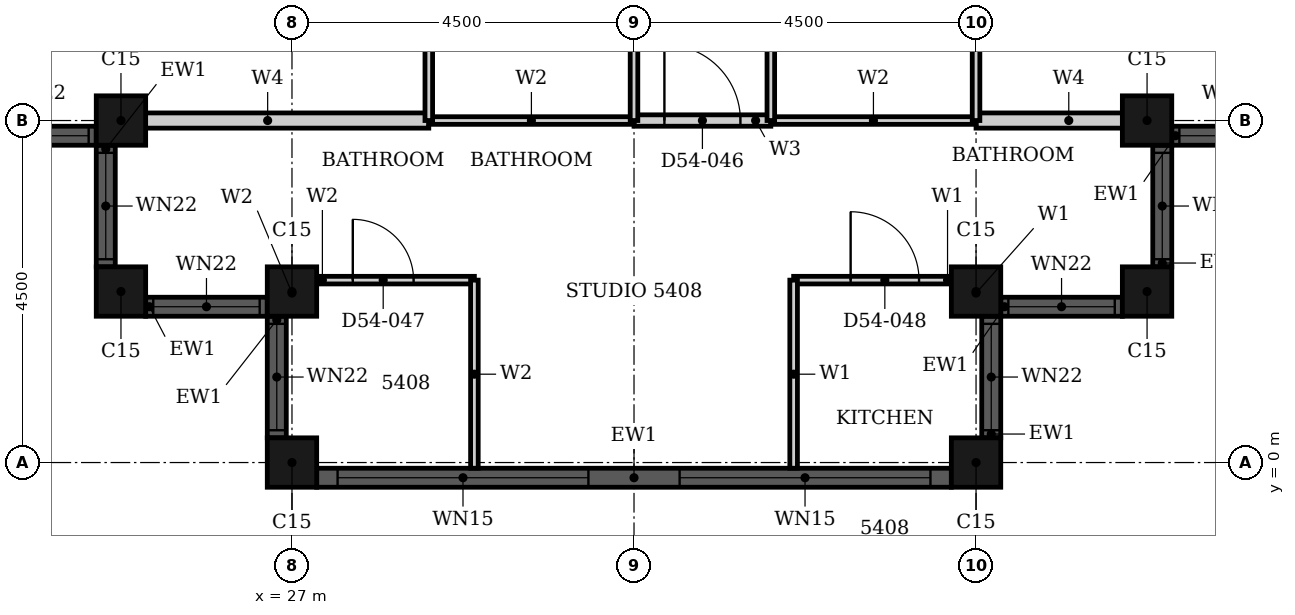
"""IFC4 building model, lengths in metres.
Left out: names, types, materials, properties, quantities, classifications, styles, units other than length and angle.
Written with IfcOpenShell. Run it as: python <this file> out.ifc"""

import sys

from ifc_helpers import new_model, si_unit, direction, frame, frame_2d, origin, origin_2d, place, context, subcontext, project, spatial, rectangle, hollow_rectangle, extrude, element, fill, save


model = new_model("IFC4")
c1 = context("Model", 3, precision=1e-05, world=origin(), true_north=direction((0.0, 1.0)))
c2 = subcontext(c1, "Body", "Model", "MODEL_VIEW")
j1 = project(units=[si_unit("LENGTHUNIT", "METRE"), si_unit("PLANEANGLEUNIT", "RADIAN")], contexts=[c1])
p1 = place(None, origin())
s1 = spatial("IfcSite", under=j1, at=p1, CompositionType="ELEMENT")
p2 = place(p1, origin())
s2 = spatial("IfcBuilding", under=s1, at=p2, CompositionType="ELEMENT")
p3 = place(p2, frame((0.0, 0.0, 214.6)))
s3 = spatial("IfcBuildingStorey", under=s2, at=p3, CompositionType="ELEMENT", Elevation=214.6)
for number, where, z_axis, x_axis in (
    (1, (24.75, 4.5, 0.0), (0.0, 0.0, 1.0), (1.0, 0.0, 0.0)),
    (2, (24.75, 2.25, 0.0), (0.0, 0.0, 1.0), (1.0, 0.0, 0.0)),
    (3, (27.0, 2.25, 0.0), (0.0, 0.0, 1.0), (1.0, 0.0, 0.0)),
    (4, (27.0, 0.0, 0.0), (0.0, 0.0, 1.0), (1.0, 0.0, 0.0)),
    (5, (36.0, 0.0, 0.0), (0.0, 0.0, 1.0), (1.0, 0.0, 0.0)),
    (6, (36.0, 2.25, 0.0), (0.0, 0.0, 1.0), (1.0, 0.0, 0.0)),
    (7, (38.25, 2.25, 0.0), (0.0, 0.0, 1.0), (1.0, 0.0, 0.0)),
    (8, (38.25, 4.5, 0.0), (0.0, 0.0, 1.0), (1.0, 0.0, 0.0)),
):
    element("IfcColumn", number, at=place(p3, frame(where, z_axis=z_axis, x_axis=x_axis)), inside=s3, PredefinedType="COLUMN", context=c2, shape_type="SweptSolid", body=[
        extrude(hollow_rectangle(XDim=0.65, YDim=0.65, WallThickness=0.021, at=origin_2d()), origin(), (0.0, 0.0, 1.0), 3.7),
    ])
p4 = place(p3, frame((22.825, 4.3, 0.0), z_axis=(0.0, 0.0, 1.0), x_axis=(1.0, 0.0, 0.0)))
e9 = element("IfcWall", 9, at=p4, inside=s3, PredefinedType="SOLIDWALL", context=c2, shape_type="SweptSolid", body=[
    extrude(rectangle(XDim=1.6, YDim=0.25, at=frame_2d((0.8, 0.0))), origin(), (0.0, 0.0, 1.0), 3.7),
])
p5 = place(p4, frame((0.1, 0.0, 0.9)))
e10 = element("IfcOpeningElement", 10, at=p5, cuts=e9, PredefinedType="OPENING", context=c2, shape_type="SweptSolid", body=[
    extrude(rectangle(XDim=1.4, YDim=1.85, at=frame_2d((0.7, 0.925))), frame((0.0, 0.135, 0.0), z_axis=(0.0, -1.0, 0.0), x_axis=(1.0, 0.0, 0.0)), (0.0, 0.0, 1.0), 0.27),
])
p6 = place(p3, frame((24.55, 4.175, 0.0), z_axis=(0.0, 0.0, 1.0), x_axis=(0.0, -1.0, 0.0)))
e11 = element("IfcWall", 11, at=p6, inside=s3, PredefinedType="SOLIDWALL", context=c2, shape_type="SweptSolid", body=[
    extrude(rectangle(XDim=1.6, YDim=0.25, at=frame_2d((0.8, 0.0))), origin(), (0.0, 0.0, 1.0), 3.7),
])
p7 = place(p6, frame((0.1, 0.0, 0.9)))
e12 = element("IfcOpeningElement", 12, at=p7, cuts=e11, PredefinedType="OPENING", context=c2, shape_type="SweptSolid", body=[
    extrude(rectangle(XDim=1.4, YDim=1.85, at=frame_2d((0.7, 0.925))), frame((0.0, 0.135, 0.0), z_axis=(0.0, -1.0, 0.0), x_axis=(1.0, 0.0, 0.0)), (0.0, 0.0, 1.0), 0.27),
])
p8 = place(p3, frame((25.075, 2.05, 0.0), z_axis=(0.0, 0.0, 1.0), x_axis=(1.0, 0.0, 0.0)))
e13 = element("IfcWall", 13, at=p8, inside=s3, PredefinedType="SOLIDWALL", context=c2, shape_type="SweptSolid", body=[
    extrude(rectangle(XDim=1.6, YDim=0.25, at=frame_2d((0.8, 0.0))), origin(), (0.0, 0.0, 1.0), 3.7),
])
p9 = place(p8, frame((0.1, 0.0, 0.9)))
e14 = element("IfcOpeningElement", 14, at=p9, cuts=e13, PredefinedType="OPENING", context=c2, shape_type="SweptSolid", body=[
    extrude(rectangle(XDim=1.4, YDim=1.85, at=frame_2d((0.7, 0.925))), frame((0.0, 0.135, 0.0), z_axis=(0.0, -1.0, 0.0), x_axis=(1.0, 0.0, 0.0)), (0.0, 0.0, 1.0), 0.27),
])
p10 = place(p3, frame((26.8, 1.925, 0.0), z_axis=(0.0, 0.0, 1.0), x_axis=(0.0, -1.0, 0.0)))
e15 = element("IfcWall", 15, at=p10, inside=s3, PredefinedType="SOLIDWALL", context=c2, shape_type="SweptSolid", body=[
    extrude(rectangle(XDim=1.6, YDim=0.25, at=frame_2d((0.8, 0.0))), origin(), (0.0, 0.0, 1.0), 3.7),
])
p11 = place(p10, frame((0.1, 0.0, 0.9)))
e16 = element("IfcOpeningElement", 16, at=p11, cuts=e15, PredefinedType="OPENING", context=c2, shape_type="SweptSolid", body=[
    extrude(rectangle(XDim=1.4, YDim=1.85, at=frame_2d((0.7, 0.925))), frame((0.0, 0.135, 0.0), z_axis=(0.0, -1.0, 0.0), x_axis=(1.0, 0.0, 0.0)), (0.0, 0.0, 1.0), 0.27),
])
p12 = place(p3, frame((27.325, -0.2, 0.0), z_axis=(0.0, 0.0, 1.0), x_axis=(1.0, 0.0, 0.0)))
e17 = element("IfcWall", 17, at=p12, inside=s3, PredefinedType="SOLIDWALL", context=c2, shape_type="SweptSolid", body=[
    extrude(rectangle(XDim=8.35, YDim=0.25, at=frame_2d((4.175, 0.0))), origin(), (0.0, 0.0, 1.0), 3.7),
])
p13 = place(p12, frame((0.275, 0.0, 0.45)))
e18 = element("IfcOpeningElement", 18, at=p13, cuts=e17, PredefinedType="OPENING", context=c2, shape_type="SweptSolid", body=[
    extrude(rectangle(XDim=3.3, YDim=2.3, at=frame_2d((1.65, 1.15))), frame((0.0, 0.135, 0.0), z_axis=(0.0, -1.0, 0.0), x_axis=(1.0, 0.0, 0.0)), (0.0, 0.0, 1.0), 0.27),
])
p14 = place(p12, frame((4.775, 0.0, 0.45)))
e19 = element("IfcOpeningElement", 19, at=p14, cuts=e17, PredefinedType="OPENING", context=c2, shape_type="SweptSolid", body=[
    extrude(rectangle(XDim=3.3, YDim=2.3, at=frame_2d((1.65, 1.15))), frame((0.0, 0.135, 0.0), z_axis=(0.0, -1.0, 0.0), x_axis=(1.0, 0.0, 0.0)), (0.0, 0.0, 1.0), 0.27),
])
p15 = place(p3, frame((36.2, 0.325, 0.0), z_axis=(0.0, 0.0, 1.0), x_axis=(0.0, 1.0, 0.0)))
e20 = element("IfcWall", 20, at=p15, inside=s3, PredefinedType="SOLIDWALL", context=c2, shape_type="SweptSolid", body=[
    extrude(rectangle(XDim=1.6, YDim=0.25, at=frame_2d((0.8, 0.0))), origin(), (0.0, 0.0, 1.0), 3.7),
])
p16 = place(p15, frame((0.1, 0.0, 0.9)))
e21 = element("IfcOpeningElement", 21, at=p16, cuts=e20, PredefinedType="OPENING", context=c2, shape_type="SweptSolid", body=[
    extrude(rectangle(XDim=1.4, YDim=1.85, at=frame_2d((0.7, 0.925))), frame((0.0, 0.135, 0.0), z_axis=(0.0, -1.0, 0.0), x_axis=(1.0, 0.0, 0.0)), (0.0, 0.0, 1.0), 0.27),
])
p17 = place(p3, frame((36.325, 2.05, 0.0), z_axis=(0.0, 0.0, 1.0), x_axis=(1.0, 0.0, 0.0)))
e22 = element("IfcWall", 22, at=p17, inside=s3, PredefinedType="SOLIDWALL", context=c2, shape_type="SweptSolid", body=[
    extrude(rectangle(XDim=1.6, YDim=0.25, at=frame_2d((0.8, 0.0))), origin(), (0.0, 0.0, 1.0), 3.7),
])
p18 = place(p17, frame((0.1, 0.0, 0.9)))
e23 = element("IfcOpeningElement", 23, at=p18, cuts=e22, PredefinedType="OPENING", context=c2, shape_type="SweptSolid", body=[
    extrude(rectangle(XDim=1.4, YDim=1.85, at=frame_2d((0.7, 0.925))), frame((0.0, 0.135, 0.0), z_axis=(0.0, -1.0, 0.0), x_axis=(1.0, 0.0, 0.0)), (0.0, 0.0, 1.0), 0.27),
])
p19 = place(p3, frame((38.45, 2.575, 0.0), z_axis=(0.0, 0.0, 1.0), x_axis=(0.0, 1.0, 0.0)))
e24 = element("IfcWall", 24, at=p19, inside=s3, PredefinedType="SOLIDWALL", context=c2, shape_type="SweptSolid", body=[
    extrude(rectangle(XDim=1.6, YDim=0.25, at=frame_2d((0.8, 0.0))), origin(), (0.0, 0.0, 1.0), 3.7),
])
p20 = place(p19, frame((0.1, 0.0, 0.9)))
e25 = element("IfcOpeningElement", 25, at=p20, cuts=e24, PredefinedType="OPENING", context=c2, shape_type="SweptSolid", body=[
    extrude(rectangle(XDim=1.4, YDim=1.85, at=frame_2d((0.7, 0.925))), frame((0.0, 0.135, 0.0), z_axis=(0.0, -1.0, 0.0), x_axis=(1.0, 0.0, 0.0)), (0.0, 0.0, 1.0), 0.27),
])
p21 = place(p3, frame((38.575, 4.3, 0.0), z_axis=(0.0, 0.0, 1.0), x_axis=(1.0, 0.0, 0.0)))
e26 = element("IfcWall", 26, at=p21, inside=s3, PredefinedType="SOLIDWALL", context=c2, shape_type="SweptSolid", body=[
    extrude(rectangle(XDim=1.6, YDim=0.25, at=frame_2d((0.8, 0.0))), origin(), (0.0, 0.0, 1.0), 3.7),
])
p22 = place(p21, frame((0.1, 0.0, 0.9)))
e27 = element("IfcOpeningElement", 27, at=p22, cuts=e26, PredefinedType="OPENING", context=c2, shape_type="SweptSolid", body=[
    extrude(rectangle(XDim=1.4, YDim=1.85, at=frame_2d((0.7, 0.925))), frame((0.0, 0.135, 0.0), z_axis=(0.0, -1.0, 0.0), x_axis=(1.0, 0.0, 0.0)), (0.0, 0.0, 1.0), 0.27),
])
p23 = place(p3, frame((31.5, 4.5, 0.0), z_axis=(0.0, 0.0, 1.0), x_axis=(1.0, 0.0, 0.0)))
e28 = element("IfcWall", 28, at=p23, inside=s3, PredefinedType="PARTITIONING", context=c2, shape_type="SweptSolid", body=[
    extrude(rectangle(XDim=1.8, YDim=0.15, at=frame_2d((0.9, 0.0))), origin(), (0.0, 0.0, 1.0), 3.4),
])
p24 = place(p23, frame((0.4, 0.0, 0.0)))
e29 = element("IfcOpeningElement", 29, at=p24, cuts=e28, PredefinedType="OPENING", context=c2, shape_type="SweptSolid", body=[
    extrude(rectangle(XDim=1.0, YDim=2.2, at=frame_2d((0.5, 1.1))), frame((0.0, 0.085, 0.0), z_axis=(0.0, -1.0, 0.0), x_axis=(1.0, 0.0, 0.0)), (0.0, 0.0, 1.0), 0.17),
])
p25 = place(p3, frame((33.6, 2.4, 0.0), z_axis=(0.0, 0.0, 1.0), x_axis=(1.0, 0.0, 0.0)))
e30 = element("IfcWall", 30, at=p25, inside=s3, PredefinedType="PARTITIONING", context=c2, shape_type="SweptSolid", body=[
    extrude(rectangle(XDim=2.4, YDim=0.1, at=frame_2d((1.2, 0.0))), origin(), (0.0, 0.0, 1.0), 3.4),
])
p26 = place(p25, frame((0.75, 0.0, 0.0)))
e31 = element("IfcOpeningElement", 31, at=p26, cuts=e30, PredefinedType="OPENING", context=c2, shape_type="SweptSolid", body=[
    extrude(rectangle(XDim=0.9, YDim=2.1, at=frame_2d((0.45, 1.05))), frame((0.0, 0.06, 0.0), z_axis=(0.0, -1.0, 0.0), x_axis=(1.0, 0.0, 0.0)), (0.0, 0.0, 1.0), 0.12),
])
p27 = place(p3, frame((33.6, -0.075, 0.0), z_axis=(0.0, 0.0, 1.0), x_axis=(0.0, 1.0, 0.0)))
e32 = element("IfcWall", 32, at=p27, inside=s3, PredefinedType="PARTITIONING", context=c2, shape_type="SweptSolid", body=[
    extrude(rectangle(XDim=2.475, YDim=0.1, at=frame_2d((1.237, 0.0))), origin(), (0.0, 0.0, 1.0), 3.4),
])
p28 = place(p3, frame((36.0, 2.06, 0.0), z_axis=(0.0, 0.0, 1.0), x_axis=(0.0, 1.0, 0.0)))
e33 = element("IfcWall", 33, at=p28, inside=s3, PredefinedType="PARTITIONING", context=c2, shape_type="SweptSolid", body=[
    extrude(rectangle(XDim=0.34, YDim=0.1, at=frame_2d((0.17, 0.0))), origin(), (0.0, 0.0, 1.0), 3.4),
])
p29 = place(p3, frame((36.0, 4.5, 0.0), z_axis=(0.0, 0.0, 1.0), x_axis=(1.0, 0.0, 0.0)))
e34 = element("IfcWall", 34, at=p29, inside=s3, PredefinedType="PARTITIONING", context=c2, shape_type="SweptSolid", body=[
    extrude(rectangle(XDim=2.44, YDim=0.2, at=frame_2d((1.22, 0.0))), origin(), (0.0, 0.0, 1.0), 3.4),
])
p30 = place(p3, frame((24.56, 4.5, 0.0), z_axis=(0.0, 0.0, 1.0), x_axis=(1.0, 0.0, 0.0)))
e35 = element("IfcWall", 35, at=p30, inside=s3, PredefinedType="PARTITIONING", context=c2, shape_type="SweptSolid", body=[
    extrude(rectangle(XDim=4.24, YDim=0.2, at=frame_2d((2.12, 0.0))), origin(), (0.0, 0.0, 1.0), 3.4),
])
p31 = place(p3, frame((27.0, 2.4, 0.0), z_axis=(0.0, 0.0, 1.0), x_axis=(1.0, 0.0, 0.0)))
e36 = element("IfcWall", 36, at=p31, inside=s3, PredefinedType="PARTITIONING", context=c2, shape_type="SweptSolid", body=[
    extrude(rectangle(XDim=2.4, YDim=0.1, at=frame_2d((1.2, 0.0))), origin(), (0.0, 0.0, 1.0), 3.4),
])
p32 = place(p31, frame((0.8, 0.0, 0.0)))
e37 = element("IfcOpeningElement", 37, at=p32, cuts=e36, PredefinedType="OPENING", context=c2, shape_type="SweptSolid", body=[
    extrude(rectangle(XDim=0.8, YDim=2.1, at=frame_2d((0.4, 1.05))), frame((0.0, 0.06, 0.0), z_axis=(0.0, -1.0, 0.0), x_axis=(1.0, 0.0, 0.0)), (0.0, 0.0, 1.0), 0.12),
])
for number, where, z_axis, x_axis in (
    (38, (33.3, 4.5, 0.0), (0.0, 0.0, 1.0), (1.0, 0.0, 0.0)),
    (39, (28.8, 4.5, 0.0), (0.0, 0.0, 1.0), (1.0, 0.0, 0.0)),
):
    element("IfcWall", number, at=place(p3, frame(where, z_axis=z_axis, x_axis=x_axis)), inside=s3, PredefinedType="PARTITIONING", context=c2, shape_type="SweptSolid", body=[
        extrude(rectangle(XDim=2.7, YDim=0.1, at=frame_2d((1.35, 0.0))), origin(), (0.0, 0.0, 1.0), 3.4),
    ])
p33 = place(p3, frame((27.0, 2.06, 0.0), z_axis=(0.0, 0.0, 1.0), x_axis=(0.0, 1.0, 0.0)))
e40 = element("IfcWall", 40, at=p33, inside=s3, PredefinedType="PARTITIONING", context=c2, shape_type="SweptSolid", body=[
    extrude(rectangle(XDim=0.34, YDim=0.1, at=frame_2d((0.17, 0.0))), origin(), (0.0, 0.0, 1.0), 3.4),
])
p34 = place(p3, frame((28.8, 4.5, 0.0), z_axis=(0.0, 0.0, 1.0), x_axis=(0.0, 1.0, 0.0)))
e41 = element("IfcWall", 41, at=p34, inside=s3, PredefinedType="PARTITIONING", context=c2, shape_type="SweptSolid", body=[
    extrude(rectangle(XDim=2.4, YDim=0.1, at=frame_2d((1.2, 0.0))), origin(), (0.0, 0.0, 1.0), 3.4),
])
p35 = place(p3, frame((29.4, -0.075, 0.0), z_axis=(0.0, 0.0, 1.0), x_axis=(0.0, 1.0, 0.0)))
e42 = element("IfcWall", 42, at=p35, inside=s3, PredefinedType="PARTITIONING", context=c2, shape_type="SweptSolid", body=[
    extrude(rectangle(XDim=2.475, YDim=0.1, at=frame_2d((1.237, 0.0))), origin(), (0.0, 0.0, 1.0), 3.4),
])
p36 = place(p3, frame((31.5, 4.5, 0.0), z_axis=(0.0, 0.0, 1.0), x_axis=(0.0, 1.0, 0.0)))
e43 = element("IfcWall", 43, at=p36, inside=s3, PredefinedType="PARTITIONING", context=c2, shape_type="SweptSolid", body=[
    extrude(rectangle(XDim=2.4, YDim=0.1, at=frame_2d((1.2, 0.0))), origin(), (0.0, 0.0, 1.0), 2.68),
])
p37 = place(p3, frame((33.3, 4.5, 0.0), z_axis=(0.0, 0.0, 1.0), x_axis=(0.0, 1.0, 0.0)))
e44 = element("IfcWall", 44, at=p37, inside=s3, PredefinedType="PARTITIONING", context=c2, shape_type="SweptSolid", body=[
    extrude(rectangle(XDim=2.4, YDim=0.1, at=frame_2d((1.2, 0.0))), origin(), (0.0, 0.0, 1.0), 3.4),
])
p38 = place(p3, frame((36.0, 4.5, 0.0), z_axis=(0.0, 0.0, 1.0), x_axis=(0.0, 1.0, 0.0)))
e45 = element("IfcWall", 45, at=p38, inside=s3, PredefinedType="PARTITIONING", context=c2, shape_type="SweptSolid", body=[
    extrude(rectangle(XDim=2.4, YDim=0.1, at=frame_2d((1.2, 0.0))), origin(), (0.0, 0.0, 1.0), 2.68),
])
p39 = place(p5, origin())
e46 = element("IfcWindow", 46, at=p39, inside=s3, PartitioningType="SINGLE_PANEL", PredefinedType="WINDOW", context=c2, shape_type="SweptSolid", body=[
    extrude(rectangle(XDim=1.4, YDim=1.85, at=frame_2d((0.7, 0.925))), frame((0.0, 0.03, 0.0), z_axis=(0.0, -1.0, 0.0), x_axis=(1.0, 0.0, 0.0)), (0.0, 0.0, 1.0), 0.06),
])
fill(e10, e46)
p40 = place(p7, origin())
e47 = element("IfcWindow", 47, at=p40, inside=s3, PartitioningType="SINGLE_PANEL", PredefinedType="WINDOW", context=c2, shape_type="SweptSolid", body=[
    extrude(rectangle(XDim=1.4, YDim=1.85, at=frame_2d((0.7, 0.925))), frame((0.0, 0.03, 0.0), z_axis=(0.0, -1.0, 0.0), x_axis=(1.0, 0.0, 0.0)), (0.0, 0.0, 1.0), 0.06),
])
fill(e12, e47)
p41 = place(p9, origin())
e48 = element("IfcWindow", 48, at=p41, inside=s3, PartitioningType="SINGLE_PANEL", PredefinedType="WINDOW", context=c2, shape_type="SweptSolid", body=[
    extrude(rectangle(XDim=1.4, YDim=1.85, at=frame_2d((0.7, 0.925))), frame((0.0, 0.03, 0.0), z_axis=(0.0, -1.0, 0.0), x_axis=(1.0, 0.0, 0.0)), (0.0, 0.0, 1.0), 0.06),
])
fill(e14, e48)
p42 = place(p11, origin())
e49 = element("IfcWindow", 49, at=p42, inside=s3, PartitioningType="SINGLE_PANEL", PredefinedType="WINDOW", context=c2, shape_type="SweptSolid", body=[
    extrude(rectangle(XDim=1.4, YDim=1.85, at=frame_2d((0.7, 0.925))), frame((0.0, 0.03, 0.0), z_axis=(0.0, -1.0, 0.0), x_axis=(1.0, 0.0, 0.0)), (0.0, 0.0, 1.0), 0.06),
])
fill(e16, e49)
p43 = place(p13, origin())
e50 = element("IfcWindow", 50, at=p43, inside=s3, PartitioningType="SINGLE_PANEL", PredefinedType="WINDOW", context=c2, shape_type="SweptSolid", body=[
    extrude(rectangle(XDim=3.3, YDim=2.3, at=frame_2d((1.65, 1.15))), frame((0.0, 0.03, 0.0), z_axis=(0.0, -1.0, 0.0), x_axis=(1.0, 0.0, 0.0)), (0.0, 0.0, 1.0), 0.06),
])
fill(e18, e50)
p44 = place(p14, origin())
e51 = element("IfcWindow", 51, at=p44, inside=s3, PartitioningType="SINGLE_PANEL", PredefinedType="WINDOW", context=c2, shape_type="SweptSolid", body=[
    extrude(rectangle(XDim=3.3, YDim=2.3, at=frame_2d((1.65, 1.15))), frame((0.0, 0.03, 0.0), z_axis=(0.0, -1.0, 0.0), x_axis=(1.0, 0.0, 0.0)), (0.0, 0.0, 1.0), 0.06),
])
fill(e19, e51)
p45 = place(p16, origin())
e52 = element("IfcWindow", 52, at=p45, inside=s3, PartitioningType="SINGLE_PANEL", PredefinedType="WINDOW", context=c2, shape_type="SweptSolid", body=[
    extrude(rectangle(XDim=1.4, YDim=1.85, at=frame_2d((0.7, 0.925))), frame((0.0, 0.03, 0.0), z_axis=(0.0, -1.0, 0.0), x_axis=(1.0, 0.0, 0.0)), (0.0, 0.0, 1.0), 0.06),
])
fill(e21, e52)
p46 = place(p18, origin())
e53 = element("IfcWindow", 53, at=p46, inside=s3, PartitioningType="SINGLE_PANEL", PredefinedType="WINDOW", context=c2, shape_type="SweptSolid", body=[
    extrude(rectangle(XDim=1.4, YDim=1.85, at=frame_2d((0.7, 0.925))), frame((0.0, 0.03, 0.0), z_axis=(0.0, -1.0, 0.0), x_axis=(1.0, 0.0, 0.0)), (0.0, 0.0, 1.0), 0.06),
])
fill(e23, e53)
p47 = place(p20, origin())
e54 = element("IfcWindow", 54, at=p47, inside=s3, PartitioningType="SINGLE_PANEL", PredefinedType="WINDOW", context=c2, shape_type="SweptSolid", body=[
    extrude(rectangle(XDim=1.4, YDim=1.85, at=frame_2d((0.7, 0.925))), frame((0.0, 0.03, 0.0), z_axis=(0.0, -1.0, 0.0), x_axis=(1.0, 0.0, 0.0)), (0.0, 0.0, 1.0), 0.06),
])
fill(e25, e54)
p48 = place(p22, origin())
e55 = element("IfcWindow", 55, at=p48, inside=s3, PartitioningType="SINGLE_PANEL", PredefinedType="WINDOW", context=c2, shape_type="SweptSolid", body=[
    extrude(rectangle(XDim=1.4, YDim=1.85, at=frame_2d((0.7, 0.925))), frame((0.0, 0.03, 0.0), z_axis=(0.0, -1.0, 0.0), x_axis=(1.0, 0.0, 0.0)), (0.0, 0.0, 1.0), 0.06),
])
fill(e27, e55)
p49 = place(p24, origin())
e56 = element("IfcDoor", 56, at=p49, inside=s3, OperationType="SINGLE_SWING_RIGHT", PredefinedType="DOOR", context=c2, shape_type="SweptSolid", body=[
    extrude(rectangle(XDim=1.0, YDim=2.2, at=frame_2d((0.5, 1.1))), frame((0.0, 0.025, 0.0), z_axis=(0.0, -1.0, 0.0), x_axis=(1.0, 0.0, 0.0)), (0.0, 0.0, 1.0), 0.05),
])
fill(e29, e56)
p50 = place(p32, origin())
e57 = element("IfcDoor", 57, at=p50, inside=s3, OperationType="SINGLE_SWING_RIGHT", PredefinedType="DOOR", context=c2, shape_type="SweptSolid", body=[
    extrude(rectangle(XDim=0.8, YDim=2.1, at=frame_2d((0.4, 1.05))), frame((0.0, 0.025, 0.0), z_axis=(0.0, -1.0, 0.0), x_axis=(1.0, 0.0, 0.0)), (0.0, 0.0, 1.0), 0.05),
])
fill(e37, e57)
p51 = place(p26, origin())
e58 = element("IfcDoor", 58, at=p51, inside=s3, OperationType="SINGLE_SWING_RIGHT", PredefinedType="DOOR", context=c2, shape_type="SweptSolid", body=[
    extrude(rectangle(XDim=0.9, YDim=2.1, at=frame_2d((0.45, 1.05))), frame((0.0, 0.025, 0.0), z_axis=(0.0, -1.0, 0.0), x_axis=(1.0, 0.0, 0.0)), (0.0, 0.0, 1.0), 0.05),
])
fill(e31, e58)
save(model, sys.argv[1])
